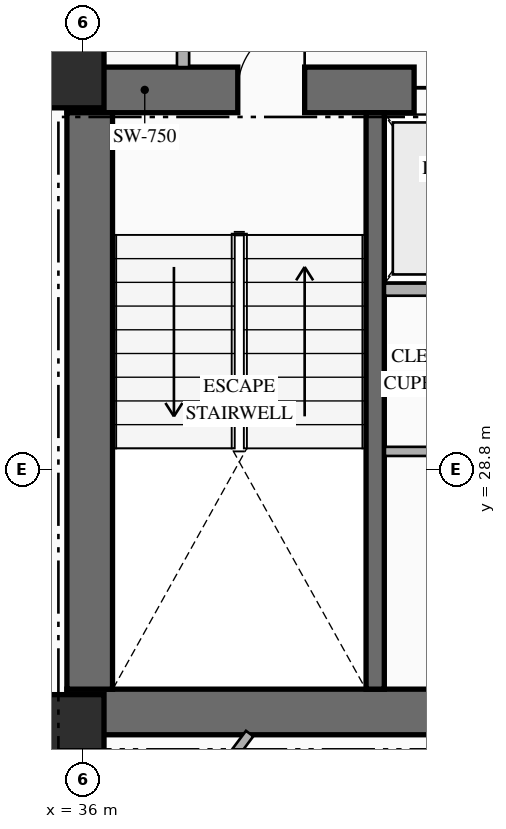
"""IFC4 building model, lengths in metres.
Left out: names, types, materials, properties, quantities, classifications, styles, units other than length and angle.
Written with IfcOpenShell. Run it as: python <this file> out.ifc"""

import sys

from ifc_helpers import new_model, si_unit, direction, frame, frame_2d, origin, origin_2d, place, context, subcontext, project, spatial, rectangle, extrude, element, fill, save


model = new_model("IFC4")
c1 = context("Model", 3, precision=1e-05, world=origin(), true_north=direction((0.0, 1.0)))
c2 = subcontext(c1, "Body", "Model", "MODEL_VIEW")
j1 = project(units=[si_unit("LENGTHUNIT", "METRE"), si_unit("PLANEANGLEUNIT", "RADIAN")], contexts=[c1])
p1 = place(None, origin())
s1 = spatial("IfcSite", under=j1, at=p1, CompositionType="ELEMENT")
p2 = place(p1, origin())
s2 = spatial("IfcBuilding", under=s1, at=p2, CompositionType="ELEMENT")
p3 = place(p2, frame((0.0, 0.0, 84.65)))
s3 = spatial("IfcBuildingStorey", under=s2, at=p3, CompositionType="ELEMENT", Elevation=84.65)
p4 = place(p3, frame((35.74, 24.815, 0.0), z_axis=(0.0, 0.0, 1.0), x_axis=(1.0, 0.0, 0.0)))
e1 = element("IfcWall", 1, at=p4, inside=s3, PredefinedType="SHEAR", context=c2, shape_type="SweptSolid", body=[
    extrude(rectangle(XDim=8.06, YDim=0.75, at=frame_2d((4.03, 0.0))), origin(), (0.0, 0.0, 1.0), 3.35),
])
p5 = place(p3, frame((35.74, 35.045, 0.0), z_axis=(0.0, 0.0, 1.0), x_axis=(1.0, 0.0, 0.0)))
e2 = element("IfcWall", 2, at=p5, inside=s3, PredefinedType="SHEAR", context=c2, shape_type="SweptSolid", body=[
    extrude(rectangle(XDim=8.06, YDim=0.75, at=frame_2d((4.03, 0.0))), origin(), (0.0, 0.0, 1.0), 3.35),
])
p6 = place(p5, frame((2.81, 0.0, 0.0)))
e3 = element("IfcOpeningElement", 3, at=p6, cuts=e2, PredefinedType="OPENING", context=c2, shape_type="SweptSolid", body=[
    extrude(rectangle(XDim=1.1, YDim=2.2, at=frame_2d((0.55, 1.1))), frame((0.0, 0.385, 0.0), z_axis=(0.0, -1.0, 0.0), x_axis=(1.0, 0.0, 0.0)), (0.0, 0.0, 1.0), 0.77),
])
p7 = place(p5, frame((5.71, 0.0, 0.0)))
e4 = element("IfcOpeningElement", 4, at=p7, cuts=e2, PredefinedType="OPENING", context=c2, shape_type="SweptSolid", body=[
    extrude(rectangle(XDim=1.12, YDim=2.15, at=frame_2d((0.56, 1.075))), frame((0.0, 0.385, 0.0), z_axis=(0.0, -1.0, 0.0), x_axis=(1.0, 0.0, 0.0)), (0.0, 0.0, 1.0), 0.77),
])
p8 = place(p3, frame((36.115, 25.19, 0.0), z_axis=(0.0, 0.0, 1.0), x_axis=(0.0, 1.0, 0.0)))
e5 = element("IfcWall", 5, at=p8, inside=s3, PredefinedType="SHEAR", context=c2, shape_type="SweptSolid", body=[
    extrude(rectangle(XDim=9.48, YDim=0.75, at=frame_2d((4.74, 0.0))), origin(), (0.0, 0.0, 1.0), 3.35),
])
p9 = place(p3, frame((40.81, 25.19, 0.0), z_axis=(0.0, 0.0, 1.0), x_axis=(0.0, 1.0, 0.0)))
e6 = element("IfcWall", 6, at=p9, inside=s3, PredefinedType="SHEAR", context=c2, shape_type="SweptSolid", body=[
    extrude(rectangle(XDim=9.48, YDim=0.3, at=frame_2d((4.74, 0.0))), origin(), (0.0, 0.0, 1.0), 3.35),
])
for number, where, z_axis, x_axis in (
    (7, (35.8, 24.55, 0.0), (0.0, 0.0, 1.0), (1.0, 0.0, 0.0)),
    (8, (35.8, 35.3, 0.0), (0.0, 0.0, 1.0), (1.0, 0.0, 0.0)),
):
    element("IfcColumn", number, at=place(p3, frame(where, z_axis=z_axis, x_axis=x_axis)), inside=s3, PredefinedType="COLUMN", context=c2, shape_type="SweptSolid", body=[
        extrude(rectangle(XDim=1.1, YDim=1.1, at=origin_2d()), origin(), (0.0, 0.0, 1.0), 3.35),
    ])
p10 = place(p3, frame((40.97, 31.76, 0.0), z_axis=(0.0, 0.0, 1.0), x_axis=(1.0, 0.0, 0.0)))
e9 = element("IfcWall", 9, at=p10, inside=s3, PredefinedType="STANDARD", context=c2, shape_type="SweptSolid", body=[
    extrude(rectangle(XDim=2.08, YDim=0.2, at=frame_2d((1.04, 0.0))), origin(), (0.0, 0.0, 1.0), 3.13),
])
p11 = place(p3, frame((40.97, 29.1, 0.0), z_axis=(0.0, 0.0, 1.0), x_axis=(1.0, 0.0, 0.0)))
e10 = element("IfcWall", 10, at=p11, inside=s3, PredefinedType="PARTITIONING", context=c2, shape_type="SweptSolid", body=[
    extrude(rectangle(XDim=2.08, YDim=0.15, at=frame_2d((1.04, 0.0))), origin(), (0.0, 0.0, 1.0), 3.13),
])
p12 = place(p3, frame((37.65, 35.42, 0.0), z_axis=(0.0, 0.0, 1.0), x_axis=(0.0, 1.0, 0.0)))
e11 = element("IfcWall", 11, at=p12, inside=s3, PredefinedType="STANDARD", context=c2, shape_type="SweptSolid", body=[
    extrude(rectangle(XDim=2.68, YDim=0.2, at=frame_2d((1.34, 0.0))), origin(), (0.0, 0.0, 1.0), 3.13),
])
p13 = place(p12, frame((0.84, 0.0, 0.0)))
e12 = element("IfcOpeningElement", 12, at=p13, cuts=e11, PredefinedType="OPENING", context=c2, shape_type="SweptSolid", body=[
    extrude(rectangle(XDim=1.0, YDim=2.2, at=frame_2d((0.5, 1.1))), frame((0.0, 0.11, 0.0), z_axis=(0.0, -1.0, 0.0), x_axis=(1.0, 0.0, 0.0)), (0.0, 0.0, 1.0), 0.22),
])
p14 = place(p3, frame((33.384, 17.312, 0.0), z_axis=(0.0, 0.0, 1.0), x_axis=(0.600008743659, 0.799993442181, 0.0)))
e13 = element("IfcWall", 13, at=p14, inside=s3, PredefinedType="PARTITIONING", context=c2, shape_type="SweptSolid", body=[
    extrude(rectangle(XDim=8.935, YDim=0.15, at=frame_2d((4.468, 0.0))), origin(), (0.0, 0.0, 1.0), 3.13),
])
p15 = place(p6, origin())
e14 = element("IfcDoor", 14, at=p15, inside=s3, OperationType="SINGLE_SWING_RIGHT", PredefinedType="DOOR", context=c2, shape_type="SweptSolid", body=[
    extrude(rectangle(XDim=1.1, YDim=2.2, at=frame_2d((0.55, 1.1))), frame((0.0, 0.025, 0.0), z_axis=(0.0, -1.0, 0.0), x_axis=(1.0, 0.0, 0.0)), (0.0, 0.0, 1.0), 0.05),
])
fill(e3, e14)
p16 = place(p7, origin())
e15 = element("IfcDoor", 15, at=p16, inside=s3, OperationType="SLIDING_TO_RIGHT", PredefinedType="USERDEFINED", context=c2, shape_type="SweptSolid", body=[
    extrude(rectangle(XDim=1.12, YDim=2.15, at=frame_2d((0.56, 1.075))), frame((0.0, 0.025, 0.0), z_axis=(0.0, -1.0, 0.0), x_axis=(1.0, 0.0, 0.0)), (0.0, 0.0, 1.0), 0.05),
])
fill(e4, e15)
save(model, sys.argv[1])
